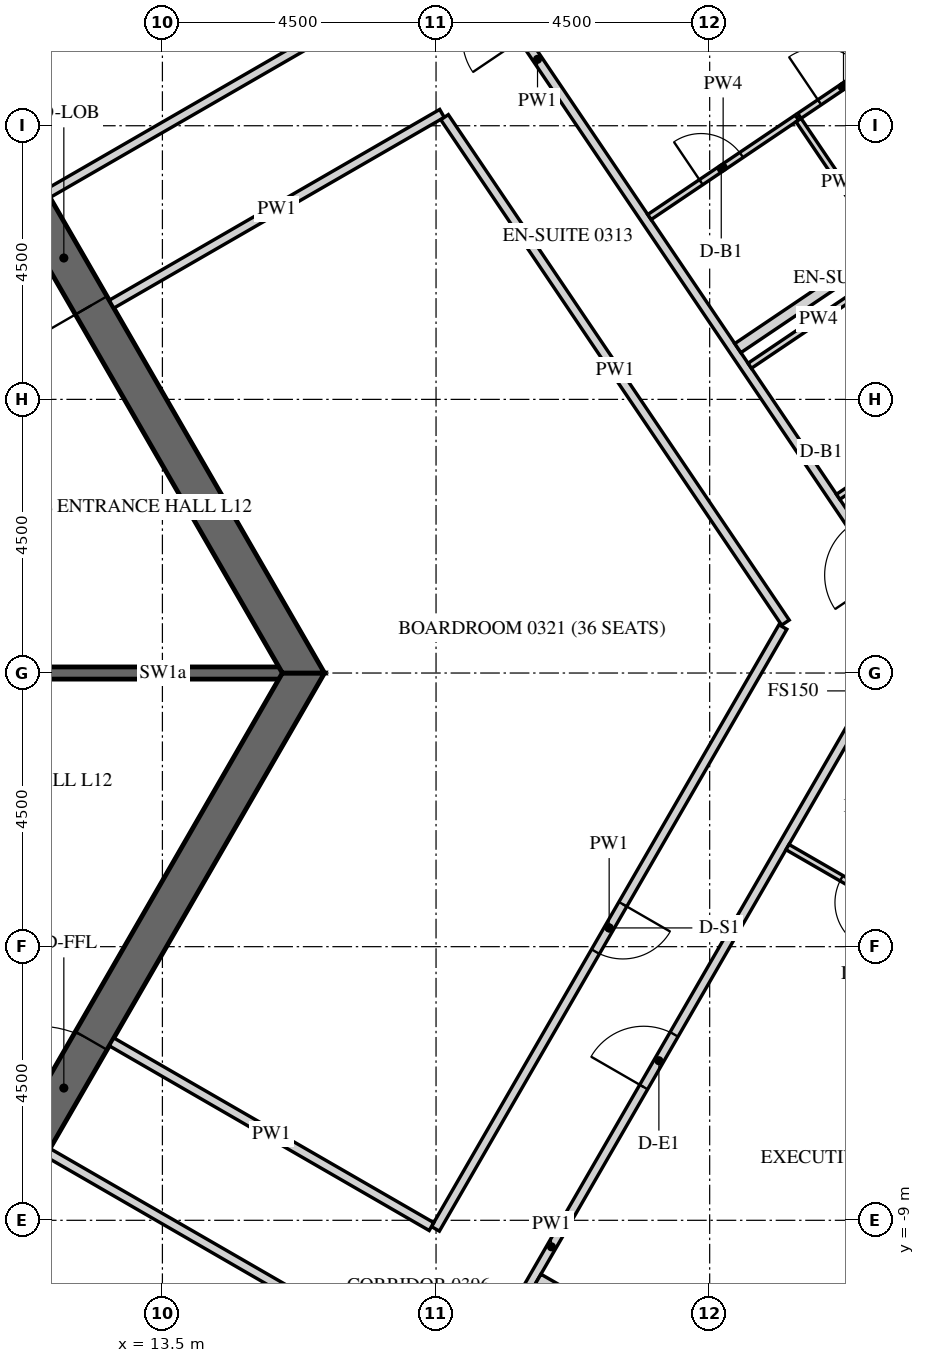
"""IFC4 building model, lengths in metres.
Left out: names, types, materials, properties, quantities, classifications, styles, units other than length and angle.
Written with IfcOpenShell. Run it as: python <this file> out.ifc"""

import sys

from ifc_helpers import new_model, si_unit, direction, frame, frame_2d, origin, place, context, subcontext, project, spatial, polyline, rectangle, outline, extrude, element, fill, save


model = new_model("IFC4")
c1 = context("Model", 3, precision=1e-05, world=origin(), true_north=direction((0.0, 1.0)))
c2 = subcontext(c1, "Body", "Model", "MODEL_VIEW")
j1 = project(units=[si_unit("LENGTHUNIT", "METRE"), si_unit("PLANEANGLEUNIT", "RADIAN")], contexts=[c1])
p1 = place(None, origin())
s1 = spatial("IfcSite", under=j1, at=p1, CompositionType="ELEMENT")
p2 = place(p1, origin())
s2 = spatial("IfcBuilding", under=s1, at=p2, CompositionType="ELEMENT")
p3 = place(p2, frame((0.0, 0.0, 60.9)))
s3 = spatial("IfcBuildingStorey", under=s2, at=p3, CompositionType="ELEMENT", Elevation=60.9)
p4 = place(p3, frame((18.83, -26.835, -0.15), z_axis=(0.0, 0.0, 1.0), x_axis=(0.500003800416, 0.866023209602, 0.0)))
e1 = element("IfcWall", 1, at=p4, inside=s3, PredefinedType="SOLIDWALL", context=c2, shape_type="SweptSolid", body=[
    extrude(outline(polyline([(-0.022, -0.275), (30.097, -0.275), (30.045, 0.275), (0.022, 0.275), (-0.022, -0.275)])), origin(), (0.0, 0.0, 1.0), 3.9),
])
p5 = place(p4, frame((1.236, 0.0, 1.05)))
e2 = element("IfcOpeningElement", 2, at=p5, cuts=e1, PredefinedType="OPENING", context=c2, shape_type="SweptSolid", body=[
    extrude(rectangle(XDim=2.4, YDim=2.4, at=frame_2d((1.2, 1.2))), frame((0.0, 0.285, 0.0), z_axis=(0.0, -1.0, 0.0), x_axis=(1.0, 0.0, 0.0)), (0.0, 0.0, 1.0), 0.57),
])
p6 = place(p4, frame((4.835, 0.0, 1.05)))
e3 = element("IfcOpeningElement", 3, at=p6, cuts=e1, PredefinedType="OPENING", context=c2, shape_type="SweptSolid", body=[
    extrude(rectangle(XDim=2.4, YDim=2.4, at=frame_2d((1.2, 1.2))), frame((0.0, 0.285, 0.0), z_axis=(0.0, -1.0, 0.0), x_axis=(1.0, 0.0, 0.0)), (0.0, 0.0, 1.0), 0.57),
])
p7 = place(p4, frame((8.436, 0.0, 1.05)))
e4 = element("IfcOpeningElement", 4, at=p7, cuts=e1, PredefinedType="OPENING", context=c2, shape_type="SweptSolid", body=[
    extrude(rectangle(XDim=2.4, YDim=2.4, at=frame_2d((1.2, 1.2))), frame((0.0, 0.285, 0.0), z_axis=(0.0, -1.0, 0.0), x_axis=(1.0, 0.0, 0.0)), (0.0, 0.0, 1.0), 0.57),
])
p8 = place(p4, frame((12.035, 0.0, 1.05)))
e5 = element("IfcOpeningElement", 5, at=p8, cuts=e1, PredefinedType="OPENING", context=c2, shape_type="SweptSolid", body=[
    extrude(rectangle(XDim=2.4, YDim=2.4, at=frame_2d((1.2, 1.2))), frame((0.0, 0.285, 0.0), z_axis=(0.0, -1.0, 0.0), x_axis=(1.0, 0.0, 0.0)), (0.0, 0.0, 1.0), 0.57),
])
p9 = place(p4, frame((15.635, 0.0, 1.05)))
e6 = element("IfcOpeningElement", 6, at=p9, cuts=e1, PredefinedType="OPENING", context=c2, shape_type="SweptSolid", body=[
    extrude(rectangle(XDim=2.4, YDim=2.4, at=frame_2d((1.2, 1.2))), frame((0.0, 0.285, 0.0), z_axis=(0.0, -1.0, 0.0), x_axis=(1.0, 0.0, 0.0)), (0.0, 0.0, 1.0), 0.57),
])
p10 = place(p4, frame((19.236, 0.0, 1.05)))
e7 = element("IfcOpeningElement", 7, at=p10, cuts=e1, PredefinedType="OPENING", context=c2, shape_type="SweptSolid", body=[
    extrude(rectangle(XDim=2.4, YDim=2.4, at=frame_2d((1.2, 1.2))), frame((0.0, 0.285, 0.0), z_axis=(0.0, -1.0, 0.0), x_axis=(1.0, 0.0, 0.0)), (0.0, 0.0, 1.0), 0.57),
])
p11 = place(p4, frame((22.835, 0.0, 1.05)))
e8 = element("IfcOpeningElement", 8, at=p11, cuts=e1, PredefinedType="OPENING", context=c2, shape_type="SweptSolid", body=[
    extrude(rectangle(XDim=2.4, YDim=2.4, at=frame_2d((1.2, 1.2))), frame((0.0, 0.285, 0.0), z_axis=(0.0, -1.0, 0.0), x_axis=(1.0, 0.0, 0.0)), (0.0, 0.0, 1.0), 0.57),
])
p12 = place(p4, frame((26.436, 0.0, 1.05)))
e9 = element("IfcOpeningElement", 9, at=p12, cuts=e1, PredefinedType="OPENING", context=c2, shape_type="SweptSolid", body=[
    extrude(rectangle(XDim=2.4, YDim=2.4, at=frame_2d((1.2, 1.2))), frame((0.0, 0.285, 0.0), z_axis=(0.0, -1.0, 0.0), x_axis=(1.0, 0.0, 0.0)), (0.0, 0.0, 1.0), 0.57),
])
p13 = place(p3, frame((33.728, 3.153, -0.15), z_axis=(0.0, 0.0, 1.0), x_axis=(-0.559192411416, 0.82903790445, 0.0)))
e10 = element("IfcWall", 10, at=p13, inside=s3, PredefinedType="SOLIDWALL", context=c2, shape_type="SweptSolid", body=[
    extrude(outline(polyline([(-0.026, -0.275), (30.093, -0.275), (30.048, 0.275), (0.026, 0.275), (-0.026, -0.275)])), origin(), (0.0, 0.0, 1.0), 3.9),
])
p14 = place(p13, frame((1.236, 0.0, 1.05)))
e11 = element("IfcOpeningElement", 11, at=p14, cuts=e10, PredefinedType="OPENING", context=c2, shape_type="SweptSolid", body=[
    extrude(rectangle(XDim=2.4, YDim=2.4, at=frame_2d((1.2, 1.2))), frame((0.0, 0.285, 0.0), z_axis=(0.0, -1.0, 0.0), x_axis=(1.0, 0.0, 0.0)), (0.0, 0.0, 1.0), 0.57),
])
p15 = place(p13, frame((4.835, 0.0, 1.05)))
e12 = element("IfcOpeningElement", 12, at=p15, cuts=e10, PredefinedType="OPENING", context=c2, shape_type="SweptSolid", body=[
    extrude(rectangle(XDim=2.4, YDim=2.4, at=frame_2d((1.2, 1.2))), frame((0.0, 0.285, 0.0), z_axis=(0.0, -1.0, 0.0), x_axis=(1.0, 0.0, 0.0)), (0.0, 0.0, 1.0), 0.57),
])
p16 = place(p13, frame((8.436, 0.0, 1.05)))
e13 = element("IfcOpeningElement", 13, at=p16, cuts=e10, PredefinedType="OPENING", context=c2, shape_type="SweptSolid", body=[
    extrude(rectangle(XDim=2.4, YDim=2.4, at=frame_2d((1.2, 1.2))), frame((0.0, 0.285, 0.0), z_axis=(0.0, -1.0, 0.0), x_axis=(1.0, 0.0, 0.0)), (0.0, 0.0, 1.0), 0.57),
])
p17 = place(p13, frame((12.035, 0.0, 1.05)))
e14 = element("IfcOpeningElement", 14, at=p17, cuts=e10, PredefinedType="OPENING", context=c2, shape_type="SweptSolid", body=[
    extrude(rectangle(XDim=2.4, YDim=2.4, at=frame_2d((1.2, 1.2))), frame((0.0, 0.285, 0.0), z_axis=(0.0, -1.0, 0.0), x_axis=(1.0, 0.0, 0.0)), (0.0, 0.0, 1.0), 0.57),
])
p18 = place(p13, frame((15.635, 0.0, 1.05)))
e15 = element("IfcOpeningElement", 15, at=p18, cuts=e10, PredefinedType="OPENING", context=c2, shape_type="SweptSolid", body=[
    extrude(rectangle(XDim=2.4, YDim=2.4, at=frame_2d((1.2, 1.2))), frame((0.0, 0.285, 0.0), z_axis=(0.0, -1.0, 0.0), x_axis=(1.0, 0.0, 0.0)), (0.0, 0.0, 1.0), 0.57),
])
p19 = place(p13, frame((19.236, 0.0, 1.05)))
e16 = element("IfcOpeningElement", 16, at=p19, cuts=e10, PredefinedType="OPENING", context=c2, shape_type="SweptSolid", body=[
    extrude(rectangle(XDim=2.4, YDim=2.4, at=frame_2d((1.2, 1.2))), frame((0.0, 0.285, 0.0), z_axis=(0.0, -1.0, 0.0), x_axis=(1.0, 0.0, 0.0)), (0.0, 0.0, 1.0), 0.57),
])
p20 = place(p13, frame((22.835, 0.0, 1.05)))
e17 = element("IfcOpeningElement", 17, at=p20, cuts=e10, PredefinedType="OPENING", context=c2, shape_type="SweptSolid", body=[
    extrude(rectangle(XDim=2.4, YDim=2.4, at=frame_2d((1.2, 1.2))), frame((0.0, 0.285, 0.0), z_axis=(0.0, -1.0, 0.0), x_axis=(1.0, 0.0, 0.0)), (0.0, 0.0, 1.0), 0.57),
])
p21 = place(p13, frame((26.436, 0.0, 1.05)))
e18 = element("IfcOpeningElement", 18, at=p21, cuts=e10, PredefinedType="OPENING", context=c2, shape_type="SweptSolid", body=[
    extrude(rectangle(XDim=2.4, YDim=2.4, at=frame_2d((1.2, 1.2))), frame((0.0, 0.285, 0.0), z_axis=(0.0, -1.0, 0.0), x_axis=(1.0, 0.0, 0.0)), (0.0, 0.0, 1.0), 0.57),
])
p22 = place(p3, frame((7.91, -13.7, -0.15), z_axis=(0.0, 0.0, 1.0), x_axis=(0.499999880136, 0.866025472988, 0.0)))
e19 = element("IfcWall", 19, at=p22, inside=s3, PredefinedType="SHEAR", context=c2, shape_type="SweptSolid", body=[
    extrude(outline(polyline([(-0.173, -0.3), (15.993, -0.3), (15.646, 0.3), (0.173, 0.3), (-0.173, -0.3)])), origin(), (0.0, 0.0, 1.0), 3.9),
])
p23 = place(p22, frame((7.039, 0.0, 0.15)))
e20 = element("IfcOpeningElement", 20, at=p23, cuts=e19, PredefinedType="OPENING", context=c2, shape_type="SweptSolid", body=[
    extrude(rectangle(XDim=1.8, YDim=2.4, at=frame_2d((0.9, 1.2))), frame((0.0, 0.31, 0.0), z_axis=(0.0, -1.0, 0.0), x_axis=(1.0, 0.0, 0.0)), (0.0, 0.0, 1.0), 0.62),
])
p24 = place(p3, frame((15.819, 0.0, -0.15), z_axis=(0.0, 0.0, 1.0), x_axis=(-0.499999880136, 0.866025472988, 0.0)))
e21 = element("IfcWall", 21, at=p24, inside=s3, PredefinedType="SHEAR", context=c2, shape_type="SweptSolid", body=[
    extrude(outline(polyline([(-0.173, -0.3), (15.993, -0.3), (15.646, 0.3), (0.173, 0.3), (-0.173, -0.3)])), origin(), (0.0, 0.0, 1.0), 3.9),
])
p25 = place(p24, frame((6.981, 0.0, 0.15)))
e22 = element("IfcOpeningElement", 22, at=p25, cuts=e21, PredefinedType="OPENING", context=c2, shape_type="SweptSolid", body=[
    extrude(rectangle(XDim=1.8, YDim=2.4, at=frame_2d((0.9, 1.2))), frame((0.0, 0.31, 0.0), z_axis=(0.0, -1.0, 0.0), x_axis=(1.0, 0.0, 0.0)), (0.0, 0.0, 1.0), 0.62),
])
p26 = place(p3, frame((11.547, 0.0, -0.15), z_axis=(0.0, 0.0, 1.0), x_axis=(1.0, 0.0, 0.0)))
e23 = element("IfcWall", 23, at=p26, inside=s3, PredefinedType="SHEAR", context=c2, shape_type="SweptSolid", body=[
    extrude(rectangle(XDim=3.926, YDim=0.2, at=frame_2d((1.963, 0.0))), origin(), (0.0, 0.0, 1.0), 3.9),
])
p27 = place(p3, frame((13.928, -19.775, 0.0), z_axis=(0.0, 0.0, 1.0), x_axis=(0.50000450071, 0.866022805283, 0.0)))
e24 = element("IfcWall", 24, at=p27, inside=s3, PredefinedType="PARTITIONING", context=c2, shape_type="SweptSolid", body=[
    extrude(rectangle(XDim=23.877, YDim=0.15, at=frame_2d((11.938, 0.0))), origin(), (0.0, 0.0, 1.0), 2.988),
])
p28 = place(p27, frame((6.443, 0.0, 0.0)))
e25 = element("IfcOpeningElement", 25, at=p28, cuts=e24, PredefinedType="OPENING", context=c2, shape_type="SweptSolid", body=[
    extrude(rectangle(XDim=1.0, YDim=2.1, at=frame_2d((0.5, 1.05))), frame((0.0, 0.085, 0.0), z_axis=(0.0, -1.0, 0.0), x_axis=(1.0, 0.0, 0.0)), (0.0, 0.0, 1.0), 0.17),
])
p29 = place(p27, frame((14.972, 0.0, 0.0)))
e26 = element("IfcOpeningElement", 26, at=p29, cuts=e24, PredefinedType="OPENING", context=c2, shape_type="SweptSolid", body=[
    extrude(rectangle(XDim=1.0, YDim=2.1, at=frame_2d((0.5, 1.05))), frame((0.0, 0.085, 0.0), z_axis=(0.0, -1.0, 0.0), x_axis=(1.0, 0.0, 0.0)), (0.0, 0.0, 1.0), 0.17),
])
p30 = place(p3, frame((25.821, 0.972, 0.0), z_axis=(0.0, 0.0, 1.0), x_axis=(-0.559201442833, 0.829031812619, 0.0)))
e27 = element("IfcWall", 27, at=p30, inside=s3, PredefinedType="PARTITIONING", context=c2, shape_type="SweptSolid", body=[
    extrude(rectangle(XDim=22.002, YDim=0.15, at=frame_2d((11.001, 0.0))), origin(), (0.0, 0.0, 1.0), 2.988),
])
p31 = place(p30, frame((0.769, 0.0, 0.0)))
e28 = element("IfcOpeningElement", 28, at=p31, cuts=e27, PredefinedType="OPENING", context=c2, shape_type="SweptSolid", body=[
    extrude(rectangle(XDim=1.0, YDim=2.1, at=frame_2d((0.5, 1.05))), frame((0.0, 0.085, 0.0), z_axis=(0.0, -1.0, 0.0), x_axis=(1.0, 0.0, 0.0)), (0.0, 0.0, 1.0), 0.17),
])
p32 = place(p30, frame((11.421, 0.0, 0.0)))
e29 = element("IfcOpeningElement", 29, at=p32, cuts=e27, PredefinedType="OPENING", context=c2, shape_type="SweptSolid", body=[
    extrude(rectangle(XDim=1.0, YDim=2.1, at=frame_2d((0.5, 1.05))), frame((0.0, 0.085, 0.0), z_axis=(0.0, -1.0, 0.0), x_axis=(1.0, 0.0, 0.0)), (0.0, 0.0, 1.0), 0.17),
])
p33 = place(p30, frame((19.711, 0.0, 0.0)))
e30 = element("IfcOpeningElement", 30, at=p33, cuts=e27, PredefinedType="OPENING", context=c2, shape_type="SweptSolid", body=[
    extrude(rectangle(XDim=1.0, YDim=2.1, at=frame_2d((0.5, 1.05))), frame((0.0, 0.085, 0.0), z_axis=(0.0, -1.0, 0.0), x_axis=(1.0, 0.0, 0.0)), (0.0, 0.0, 1.0), 0.17),
])
p34 = place(p3, frame((12.664, 6.066, 0.0), z_axis=(0.0, 0.0, 1.0), x_axis=(0.866036561919, 0.499980673046, 0.0)))
e31 = element("IfcWall", 31, at=p34, inside=s3, PredefinedType="PARTITIONING", context=c2, shape_type="SweptSolid", body=[
    extrude(rectangle(XDim=6.275, YDim=0.15, at=frame_2d((3.137, 0.0))), origin(), (0.0, 0.0, 1.0), 2.988),
])
p35 = place(p3, frame((18.14, 9.141, 0.0), z_axis=(0.0, 0.0, 1.0), x_axis=(0.55918799196, -0.829040885389, 0.0)))
e32 = element("IfcWall", 32, at=p35, inside=s3, PredefinedType="PARTITIONING", context=c2, shape_type="SweptSolid", body=[
    extrude(rectangle(XDim=10.025, YDim=0.15, at=frame_2d((5.013, 0.0))), origin(), (0.0, 0.0, 1.0), 2.988),
])
p36 = place(p3, frame((23.704, 0.757, 0.0), z_axis=(0.0, 0.0, 1.0), x_axis=(-0.500010297365, -0.866019458516, 0.0)))
e33 = element("IfcWall", 33, at=p36, inside=s3, PredefinedType="PARTITIONING", context=c2, shape_type="SweptSolid", body=[
    extrude(rectangle(XDim=11.429, YDim=0.15, at=frame_2d((5.714, 0.0))), origin(), (0.0, 0.0, 1.0), 2.988),
])
p37 = place(p36, frame((5.264, 0.0, 0.0)))
e34 = element("IfcOpeningElement", 34, at=p37, cuts=e33, PredefinedType="OPENING", context=c2, shape_type="SweptSolid", body=[
    extrude(rectangle(XDim=0.9, YDim=2.1, at=frame_2d((0.45, 1.05))), frame((0.0, 0.085, 0.0), z_axis=(0.0, -1.0, 0.0), x_axis=(1.0, 0.0, 0.0)), (0.0, 0.0, 1.0), 0.17),
])
p38 = place(p3, frame((17.925, -9.103, 0.0), z_axis=(0.0, 0.0, 1.0), x_axis=(-0.866013586754, 0.500020467139, 0.0)))
e35 = element("IfcWall", 35, at=p38, inside=s3, PredefinedType="PARTITIONING", context=c2, shape_type="SweptSolid", body=[
    extrude(rectangle(XDim=6.075, YDim=0.15, at=frame_2d((3.038, 0.0))), origin(), (0.0, 0.0, 1.0), 2.988),
])
p39 = place(p3, frame((11.614, -7.884, 0.0), z_axis=(0.0, 0.0, 1.0), x_axis=(0.866033542371, -0.499985903289, 0.0)))
e36 = element("IfcWall", 36, at=p39, inside=s3, PredefinedType="PARTITIONING", context=c2, shape_type="SweptSolid", body=[
    extrude(rectangle(XDim=6.15, YDim=0.15, at=frame_2d((3.075, 0.0))), origin(), (0.0, 0.0, 1.0), 2.988),
])
p40 = place(p3, frame((16.855, 10.911, 0.0), z_axis=(0.0, 0.0, 1.0), x_axis=(-0.866020343444, -0.500008764664, 0.0)))
e37 = element("IfcWall", 37, at=p40, inside=s3, PredefinedType="PARTITIONING", context=c2, shape_type="SweptSolid", body=[
    extrude(rectangle(XDim=6.053, YDim=0.15, at=frame_2d((3.026, 0.0))), origin(), (0.0, 0.0, 1.0), 2.988),
])
p41 = place(p3, frame((26.11, -13.676, 0.0), z_axis=(0.0, 0.0, 1.0), x_axis=(-0.866014745021, 0.500018461065, 0.0)))
e38 = element("IfcWall", 38, at=p41, inside=s3, PredefinedType="PARTITIONING", context=c2, shape_type="SweptSolid", body=[
    extrude(rectangle(XDim=7.425, YDim=0.18, at=frame_2d((3.712, 0.0))), origin(), (0.0, 0.0, 1.0), 2.988),
])
p42 = place(p3, frame((26.27, -4.3, 0.0), z_axis=(0.0, 0.0, 1.0), x_axis=(-0.866018712932, 0.500011588718, 0.0)))
e39 = element("IfcWall", 39, at=p42, inside=s3, PredefinedType="PARTITIONING", context=c2, shape_type="SweptSolid", body=[
    extrude(rectangle(XDim=2.875, YDim=0.1, at=frame_2d((1.438, 0.0))), origin(), (0.0, 0.0, 1.0), 2.988),
])
p43 = place(p42, frame((1.05, 0.0, 0.0)))
e40 = element("IfcOpeningElement", 40, at=p43, cuts=e39, PredefinedType="OPENING", context=c2, shape_type="SweptSolid", body=[
    extrude(rectangle(XDim=0.8, YDim=2.1, at=frame_2d((0.4, 1.05))), frame((0.0, 0.06, 0.0), z_axis=(0.0, -1.0, 0.0), x_axis=(1.0, 0.0, 0.0)), (0.0, 0.0, 1.0), 0.12),
])
p44 = place(p3, frame((23.159, 5.053, 0.0), z_axis=(0.0, 0.0, 1.0), x_axis=(0.829047014003, 0.559178905694, 0.0)))
e41 = element("IfcWall", 41, at=p44, inside=s3, PredefinedType="PARTITIONING", context=c2, shape_type="SweptSolid", body=[
    extrude(rectangle(XDim=2.725, YDim=0.1, at=frame_2d((1.362, 0.0))), origin(), (0.0, 0.0, 1.0), 2.988),
])
p45 = place(p3, frame((26.83, 4.393, 0.0), z_axis=(0.0, 0.0, 1.0), x_axis=(-0.82904753069, -0.559178139645, 0.0)))
e42 = element("IfcWall", 42, at=p45, inside=s3, PredefinedType="PARTITIONING", context=c2, shape_type="SweptSolid", body=[
    extrude(rectangle(XDim=2.675, YDim=0.1, at=frame_2d((1.337, 0.0))), origin(), (0.0, 0.0, 1.0), 2.988),
])
p46 = place(p45, frame((0.95, 0.0, 0.0)))
e43 = element("IfcOpeningElement", 43, at=p46, cuts=e42, PredefinedType="OPENING", context=c2, shape_type="SweptSolid", body=[
    extrude(rectangle(XDim=0.8, YDim=2.1, at=frame_2d((0.4, 1.05))), frame((0.0, 0.06, 0.0), z_axis=(0.0, -1.0, 0.0), x_axis=(1.0, 0.0, 0.0)), (0.0, 0.0, 1.0), 0.12),
])
p47 = place(p3, frame((29.119, 9.495, 0.0), z_axis=(0.0, 0.0, 1.0), x_axis=(-0.829038452737, -0.559191598545, 0.0)))
e44 = element("IfcWall", 44, at=p47, inside=s3, PredefinedType="PARTITIONING", context=c2, shape_type="SweptSolid", body=[
    extrude(rectangle(XDim=7.425, YDim=0.18, at=frame_2d((3.713, 0.0))), origin(), (0.0, 0.0, 1.0), 2.988),
])
p48 = place(p3, frame((21.509, 7.499, 0.0), z_axis=(0.0, 0.0, 1.0), x_axis=(0.829033436212, 0.559199035802, 0.0)))
e45 = element("IfcWall", 45, at=p48, inside=s3, PredefinedType="PARTITIONING", context=c2, shape_type="SweptSolid", body=[
    extrude(rectangle(XDim=2.925, YDim=0.1, at=frame_2d((1.462, 0.0))), origin(), (0.0, 0.0, 1.0), 2.988),
])
p49 = place(p48, frame((1.025, 0.0, 0.0)))
e46 = element("IfcOpeningElement", 46, at=p49, cuts=e45, PredefinedType="OPENING", context=c2, shape_type="SweptSolid", body=[
    extrude(rectangle(XDim=0.8, YDim=2.1, at=frame_2d((0.4, 1.05))), frame((0.0, 0.06, 0.0), z_axis=(0.0, -1.0, 0.0), x_axis=(1.0, 0.0, 0.0)), (0.0, 0.0, 1.0), 0.12),
])
p50 = place(p3, frame((23.975, 9.162, 0.0), z_axis=(0.0, 0.0, 1.0), x_axis=(0.829011970545, 0.559230858138, 0.0)))
e47 = element("IfcWall", 47, at=p50, inside=s3, PredefinedType="PARTITIONING", context=c2, shape_type="SweptSolid", body=[
    extrude(rectangle(XDim=1.75, YDim=0.1, at=frame_2d((0.875, 0.0))), origin(), (0.0, 0.0, 1.0), 2.988),
])
p51 = place(p50, frame((0.4, 0.0, 0.0)))
e48 = element("IfcOpeningElement", 48, at=p51, cuts=e47, PredefinedType="OPENING", context=c2, shape_type="SweptSolid", body=[
    extrude(rectangle(XDim=0.9, YDim=2.1, at=frame_2d((0.45, 1.05))), frame((0.0, 0.06, 0.0), z_axis=(0.0, -1.0, 0.0), x_axis=(1.0, 0.0, 0.0)), (0.0, 0.0, 1.0), 0.12),
])
p52 = place(p3, frame((25.338, 7.053, 0.0), z_axis=(0.0, 0.0, 1.0), x_axis=(-0.559249542518, 0.82899936622, 0.0)))
e49 = element("IfcWall", 49, at=p52, inside=s3, PredefinedType="PARTITIONING", context=c2, shape_type="SweptSolid", body=[
    extrude(rectangle(XDim=2.46, YDim=0.1, at=frame_2d((1.23, 0.0))), origin(), (0.0, 0.0, 1.0), 2.988),
])
p53 = place(p25, origin())
e50 = element("IfcDoor", 50, at=p53, inside=s3, OperationType="DOUBLE_DOOR_SINGLE_SWING", PredefinedType="DOOR", context=c2, shape_type="SweptSolid", body=[
    extrude(rectangle(XDim=1.8, YDim=2.4, at=frame_2d((0.9, 1.2))), frame((0.0, 0.025, 0.0), z_axis=(0.0, -1.0, 0.0), x_axis=(1.0, 0.0, 0.0)), (0.0, 0.0, 1.0), 0.05),
])
fill(e22, e50)
p54 = place(p23, origin())
e51 = element("IfcDoor", 51, at=p54, inside=s3, OperationType="DOUBLE_DOOR_SINGLE_SWING", PredefinedType="DOOR", context=c2, shape_type="SweptSolid", body=[
    extrude(rectangle(XDim=1.8, YDim=2.4, at=frame_2d((0.9, 1.2))), frame((0.0, 0.025, 0.0), z_axis=(0.0, -1.0, 0.0), x_axis=(1.0, 0.0, 0.0)), (0.0, 0.0, 1.0), 0.05),
])
fill(e20, e51)
p55 = place(p29, origin())
e52 = element("IfcDoor", 52, at=p55, inside=s3, OperationType="SINGLE_SWING_LEFT", PredefinedType="DOOR", context=c2, shape_type="SweptSolid", body=[
    extrude(rectangle(XDim=1.0, YDim=2.1, at=frame_2d((0.5, 1.05))), frame((0.0, 0.025, 0.0), z_axis=(0.0, -1.0, 0.0), x_axis=(1.0, 0.0, 0.0)), (0.0, 0.0, 1.0), 0.05),
])
fill(e26, e52)
p56 = place(p43, origin())
e53 = element("IfcDoor", 53, at=p56, inside=s3, OperationType="SINGLE_SWING_LEFT", PredefinedType="DOOR", context=c2, shape_type="SweptSolid", body=[
    extrude(rectangle(XDim=0.8, YDim=2.1, at=frame_2d((0.4, 1.05))), frame((0.0, 0.025, 0.0), z_axis=(0.0, -1.0, 0.0), x_axis=(1.0, 0.0, 0.0)), (0.0, 0.0, 1.0), 0.05),
])
fill(e40, e53)
p57 = place(p49, origin())
e54 = element("IfcDoor", 54, at=p57, inside=s3, OperationType="SINGLE_SWING_RIGHT", PredefinedType="DOOR", context=c2, shape_type="SweptSolid", body=[
    extrude(rectangle(XDim=0.8, YDim=2.1, at=frame_2d((0.4, 1.05))), frame((0.0, 0.025, 0.0), z_axis=(0.0, -1.0, 0.0), x_axis=(1.0, 0.0, 0.0)), (0.0, 0.0, 1.0), 0.05),
])
fill(e46, e54)
p58 = place(p51, origin())
e55 = element("IfcDoor", 55, at=p58, inside=s3, OperationType="SINGLE_SWING_RIGHT", PredefinedType="DOOR", context=c2, shape_type="SweptSolid", body=[
    extrude(rectangle(XDim=0.9, YDim=2.1, at=frame_2d((0.45, 1.05))), frame((0.0, 0.025, 0.0), z_axis=(0.0, -1.0, 0.0), x_axis=(1.0, 0.0, 0.0)), (0.0, 0.0, 1.0), 0.05),
])
fill(e48, e55)
p59 = place(p37, origin())
e56 = element("IfcDoor", 56, at=p59, inside=s3, OperationType="SINGLE_SWING_LEFT", PredefinedType="DOOR", context=c2, shape_type="SweptSolid", body=[
    extrude(rectangle(XDim=0.9, YDim=2.1, at=frame_2d((0.45, 1.05))), frame((0.0, 0.025, 0.0), z_axis=(0.0, -1.0, 0.0), x_axis=(1.0, 0.0, 0.0)), (0.0, 0.0, 1.0), 0.05),
])
fill(e34, e56)
save(model, sys.argv[1])
